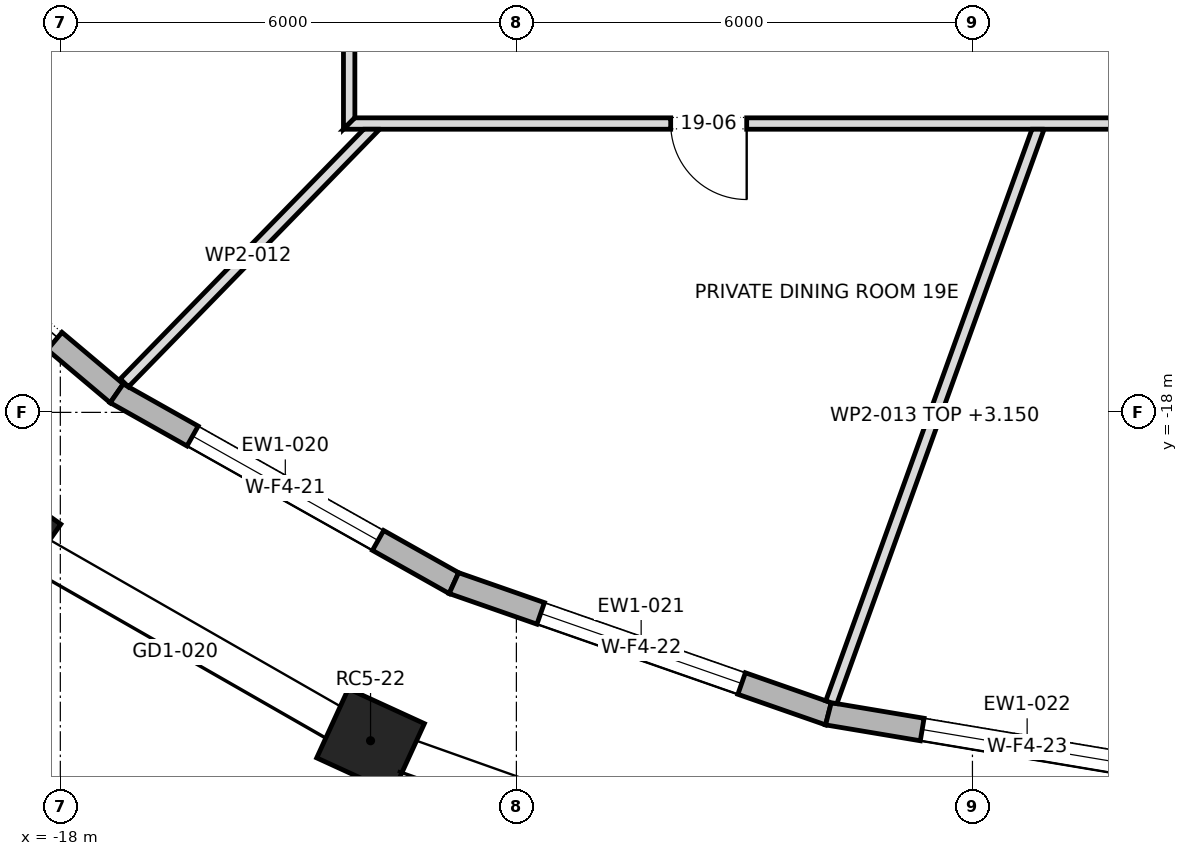
"""IFC4 building model, lengths in metres.
Left out: names, types, materials, properties, quantities, classifications, styles, units other than length and angle.
Written with IfcOpenShell. Run it as: python <this file> out.ifc"""

import sys

from ifc_helpers import new_model, si_unit, direction, frame, frame_2d, origin, origin_2d, place, context, subcontext, project, spatial, polyline, rectangle, outline, extrude, element, fill, save


model = new_model("IFC4")
c1 = context("Model", 3, precision=1e-05, world=origin(), true_north=direction((0.0, 1.0)))
c2 = subcontext(c1, "Body", "Model", "MODEL_VIEW")
j1 = project(units=[si_unit("LENGTHUNIT", "METRE"), si_unit("PLANEANGLEUNIT", "RADIAN")], contexts=[c1])
p1 = place(None, origin())
s1 = spatial("IfcSite", under=j1, at=p1, CompositionType="ELEMENT")
p2 = place(p1, origin())
s2 = spatial("IfcBuilding", under=s1, at=p2, CompositionType="ELEMENT")
p3 = place(p2, frame((0.0, 0.0, 276.3)))
s3 = spatial("IfcBuildingStorey", under=s2, at=p3, CompositionType="ELEMENT", Elevation=276.3)
for number, where, z_axis, x_axis in (
    (1, (-18.731, -19.564, 0.0), (0.0, 0.0, 1.0), (0.818, -0.575, 0.0)),
    (2, (-13.919, -22.32, 0.0), (0.0, 0.0, 1.0), (0.909, -0.417, 0.0)),
):
    element("IfcColumn", number, at=place(p3, frame(where, z_axis=z_axis, x_axis=x_axis)), inside=s3, PredefinedType="COLUMN", context=c2, shape_type="SweptSolid", body=[
        extrude(rectangle(XDim=1.1, YDim=1.0, at=origin_2d()), origin(), (0.0, 0.0, 1.0), 4.0),
    ])
p4 = place(p3, frame((-21.032, -14.57, 0.0), z_axis=(0.0, 0.0, 1.0), x_axis=(0.764832940795, -0.644228664897, 0.0)))
e3 = element("IfcWall", 3, at=p4, inside=s3, PredefinedType="STANDARD", context=c2, shape_type="SweptSolid", body=[
    extrude(outline(polyline([(-0.015, -0.15), (4.949, -0.15), (4.921, 0.15), (0.015, 0.15), (-0.015, -0.15)])), origin(), (0.0, 0.0, 1.0), 3.7),
])
p5 = place(p4, frame((1.068, 0.0, 0.0)))
e4 = element("IfcOpeningElement", 4, at=p5, cuts=e3, PredefinedType="OPENING", context=c2, shape_type="SweptSolid", body=[
    extrude(rectangle(XDim=2.8, YDim=3.25, at=frame_2d((1.4, 1.625))), frame((0.0, 0.162, 0.0), z_axis=(0.0, -1.0, 0.0), x_axis=(1.0, 0.0, 0.0)), (0.0, 0.0, 1.0), 0.324),
])
p6 = place(p3, frame((-17.258, -17.75, 0.0), z_axis=(0.0, 0.0, 1.0), x_axis=(0.871433320402, -0.490513983585, 0.0)))
e5 = element("IfcWall", 5, at=p6, inside=s3, PredefinedType="STANDARD", context=c2, shape_type="SweptSolid", body=[
    extrude(outline(polyline([(-0.014, -0.15), (5.104, -0.15), (5.077, 0.15), (0.014, 0.15), (-0.014, -0.15)])), origin(), (0.0, 0.0, 1.0), 3.7),
])
p7 = place(p6, frame((1.145, 0.0, 0.6)))
e6 = element("IfcOpeningElement", 6, at=p7, cuts=e5, PredefinedType="OPENING", context=c2, shape_type="SweptSolid", body=[
    extrude(rectangle(XDim=2.8, YDim=2.65, at=frame_2d((1.4, 1.325))), frame((0.0, 0.162, 0.0), z_axis=(0.0, -1.0, 0.0), x_axis=(1.0, 0.0, 0.0)), (0.0, 0.0, 1.0), 0.324),
])
p8 = place(p3, frame((-12.822, -20.246, 0.0), z_axis=(0.0, 0.0, 1.0), x_axis=(0.9441693858, -0.329460423904, 0.0)))
e7 = element("IfcWall", 7, at=p8, inside=s3, PredefinedType="STANDARD", context=c2, shape_type="SweptSolid", body=[
    extrude(outline(polyline([(-0.013, -0.15), (5.231, -0.15), (5.206, 0.15), (0.013, 0.15), (-0.013, -0.15)])), origin(), (0.0, 0.0, 1.0), 3.7),
])
p9 = place(p8, frame((1.209, 0.0, 0.6)))
e8 = element("IfcOpeningElement", 8, at=p9, cuts=e7, PredefinedType="OPENING", context=c2, shape_type="SweptSolid", body=[
    extrude(rectangle(XDim=2.8, YDim=2.65, at=frame_2d((1.4, 1.325))), frame((0.0, 0.162, 0.0), z_axis=(0.0, -1.0, 0.0), x_axis=(1.0, 0.0, 0.0)), (0.0, 0.0, 1.0), 0.324),
])
p10 = place(p3, frame((-7.895, -21.966, 0.0), z_axis=(0.0, 0.0, 1.0), x_axis=(0.986250435411, -0.165257612993, 0.0)))
e9 = element("IfcWall", 9, at=p10, inside=s3, PredefinedType="STANDARD", context=c2, shape_type="SweptSolid", body=[
    extrude(outline(polyline([(-0.013, -0.15), (5.315, -0.15), (5.29, 0.15), (0.013, 0.15), (-0.013, -0.15)])), origin(), (0.0, 0.0, 1.0), 3.7),
])
p11 = place(p10, frame((1.251, 0.0, 0.6)))
e10 = element("IfcOpeningElement", 10, at=p11, cuts=e9, PredefinedType="OPENING", context=c2, shape_type="SweptSolid", body=[
    extrude(rectangle(XDim=2.8, YDim=2.65, at=frame_2d((1.4, 1.325))), frame((0.0, 0.162, 0.0), z_axis=(0.0, -1.0, 0.0), x_axis=(1.0, 0.0, 0.0)), (0.0, 0.0, 1.0), 0.324),
])
p12 = place(p3, frame((-14.2, -14.275, 0.0), z_axis=(0.0, 0.0, 1.0), x_axis=(0.0, 1.0, 0.0)))
e11 = element("IfcWall", 11, at=p12, inside=s3, PredefinedType="PARTITIONING", context=c2, shape_type="SweptSolid", body=[
    extrude(outline(polyline([(0.15, -0.075), (2.033, -0.075), (3.917, -0.075), (5.8, -0.075), (7.683, -0.075), (9.567, -0.075), (11.45, -0.075), (13.333, -0.075), (15.217, -0.075), (17.1, -0.075), (18.983, -0.075), (20.866, -0.075), (22.75, -0.075), (24.633, -0.075), (26.517, -0.075), (28.4, -0.075), (28.55, 0.075), (28.55, 0.075), (26.646, 0.075), (24.743, 0.075), (22.84, 0.075), (20.937, 0.075), (19.033, 0.075), (17.13, 0.075), (15.227, 0.075), (13.323, 0.075), (11.42, 0.075), (9.517, 0.075), (7.613, 0.075), (5.71, 0.075), (3.807, 0.075), (1.903, 0.075), (0.0, 0.075), (0.15, -0.075)])), origin(), (0.0, 0.0, 1.0), 3.7),
])
p13 = place(p12, frame((20.5, 0.0, 0.0)))
e12 = element("IfcOpeningElement", 12, at=p13, cuts=e11, PredefinedType="OPENING", context=c2, shape_type="SweptSolid", body=[
    extrude(rectangle(XDim=1.0, YDim=2.1, at=frame_2d((0.5, 1.05))), frame((0.0, 0.087, 0.0), z_axis=(0.0, -1.0, 0.0), x_axis=(1.0, 0.0, 0.0)), (0.0, 0.0, 1.0), 0.174),
])
p14 = place(p12, frame((11.595, 0.0, 0.0)))
e13 = element("IfcOpeningElement", 13, at=p14, cuts=e11, PredefinedType="OPENING", context=c2, shape_type="SweptSolid", body=[
    extrude(rectangle(XDim=1.0, YDim=2.1, at=frame_2d((0.5, 1.05))), frame((0.0, 0.087, 0.0), z_axis=(0.0, -1.0, 0.0), x_axis=(1.0, 0.0, 0.0)), (0.0, 0.0, 1.0), 0.174),
])
p15 = place(p12, frame((15.225, 0.0, 0.0)))
e14 = element("IfcOpeningElement", 14, at=p15, cuts=e11, PredefinedType="OPENING", context=c2, shape_type="SweptSolid", body=[
    extrude(rectangle(XDim=1.0, YDim=2.1, at=frame_2d((0.5, 1.05))), frame((0.0, 0.087, 0.0), z_axis=(0.0, -1.0, 0.0), x_axis=(1.0, 0.0, 0.0)), (0.0, 0.0, 1.0), 0.174),
])
p16 = place(p12, frame((4.86, 0.0, 0.0)))
e15 = element("IfcOpeningElement", 15, at=p16, cuts=e11, PredefinedType="OPENING", context=c2, shape_type="SweptSolid", body=[
    extrude(rectangle(XDim=1.0, YDim=2.1, at=frame_2d((0.5, 1.05))), frame((0.0, 0.087, 0.0), z_axis=(0.0, -1.0, 0.0), x_axis=(1.0, 0.0, 0.0)), (0.0, 0.0, 1.0), 0.174),
])
p17 = place(p3, frame((-14.275, -14.2, 0.0), z_axis=(0.0, 0.0, 1.0), x_axis=(1.0, 0.0, 0.0)))
e16 = element("IfcWall", 16, at=p17, inside=s3, PredefinedType="PARTITIONING", context=c2, shape_type="SweptSolid", body=[
    extrude(outline(polyline([(28.55, -0.075), (28.55, -0.075), (28.4, 0.075), (26.517, 0.075), (24.633, 0.075), (22.75, 0.075), (20.866, 0.075), (18.983, 0.075), (17.1, 0.075), (15.217, 0.075), (13.333, 0.075), (11.45, 0.075), (9.567, 0.075), (7.683, 0.075), (5.8, 0.075), (3.917, 0.075), (2.033, 0.075), (0.15, 0.075), (0.0, -0.075), (1.903, -0.075), (3.807, -0.075), (5.71, -0.075), (7.613, -0.075), (9.517, -0.075), (11.42, -0.075), (13.323, -0.075), (15.227, -0.075), (17.13, -0.075), (19.033, -0.075), (20.937, -0.075), (22.84, -0.075), (24.743, -0.075), (26.646, -0.075), (28.55, -0.075)])), origin(), (0.0, 0.0, 1.0), 3.7),
])
p18 = place(p17, frame((4.305, 0.0, 0.0)))
e17 = element("IfcOpeningElement", 17, at=p18, cuts=e16, PredefinedType="OPENING", context=c2, shape_type="SweptSolid", body=[
    extrude(rectangle(XDim=1.0, YDim=2.1, at=frame_2d((0.5, 1.05))), frame((0.0, 0.087, 0.0), z_axis=(0.0, -1.0, 0.0), x_axis=(1.0, 0.0, 0.0)), (0.0, 0.0, 1.0), 0.174),
])
p19 = place(p17, frame((17.735, 0.0, 0.0)))
e18 = element("IfcOpeningElement", 18, at=p19, cuts=e16, PredefinedType="OPENING", context=c2, shape_type="SweptSolid", body=[
    extrude(rectangle(XDim=1.8, YDim=2.1, at=frame_2d((0.9, 1.05))), frame((0.0, 0.087, 0.0), z_axis=(0.0, -1.0, 0.0), x_axis=(1.0, 0.0, 0.0)), (0.0, 0.0, 1.0), 0.174),
])
p20 = place(p3, frame((-13.852, -14.223, 0.0), z_axis=(0.0, 0.0, 1.0), x_axis=(-0.69820654799, -0.715896372629, 0.0)))
e19 = element("IfcWall", 19, at=p20, inside=s3, PredefinedType="PARTITIONING", context=c2, shape_type="SweptSolid", body=[
    extrude(outline(polyline([(4.734, -0.075), (4.734, 0.075), (4.734, 0.075), (3.156, 0.075), (1.578, 0.075), (0.0, 0.075), (0.0, 0.075), (0.146, -0.075), (1.675, -0.075), (3.205, -0.075), (4.734, -0.075)])), origin(), (0.0, 0.0, 1.0), 3.7),
])
p21 = place(p3, frame((-5.128, -14.25, 0.0), z_axis=(0.0, 0.0, 1.0), x_axis=(-0.339369350229, -0.940653200773, 0.0)))
e20 = element("IfcWall", 20, at=p21, inside=s3, PredefinedType="PARTITIONING", context=c2, shape_type="SweptSolid", body=[
    extrude(outline(polyline([(8.047, -0.075), (8.047, -0.03), (8.047, 0.001), (8.033, 0.075), (6.427, 0.075), (4.82, 0.075), (3.213, 0.075), (1.607, 0.075), (0.0, 0.075), (0.0, 0.074), (0.054, -0.075), (2.052, -0.075), (4.05, -0.075), (6.049, -0.075), (8.047, -0.075)])), origin(), (0.0, 0.0, 1.0), 3.15),
])
p22 = place(p5, origin())
e21 = element("IfcDoor", 21, at=p22, inside=s3, OperationType="DOUBLE_DOOR_SLIDING", PredefinedType="DOOR", context=c2, shape_type="SweptSolid", body=[
    extrude(rectangle(XDim=2.8, YDim=3.25, at=frame_2d((1.4, 1.625))), frame((0.0, 0.025, 0.0), z_axis=(0.0, -1.0, 0.0), x_axis=(1.0, 0.0, 0.0)), (0.0, 0.0, 1.0), 0.05),
])
fill(e4, e21)
p23 = place(p7, origin())
e22 = element("IfcWindow", 22, at=p23, inside=s3, PartitioningType="DOUBLE_PANEL_VERTICAL", PredefinedType="WINDOW", context=c2, shape_type="SweptSolid", body=[
    extrude(rectangle(XDim=2.8, YDim=2.65, at=frame_2d((1.4, 1.325))), frame((0.0, 0.03, 0.0), z_axis=(0.0, -1.0, 0.0), x_axis=(1.0, 0.0, 0.0)), (0.0, 0.0, 1.0), 0.06),
])
fill(e6, e22)
p24 = place(p9, origin())
e23 = element("IfcWindow", 23, at=p24, inside=s3, PartitioningType="DOUBLE_PANEL_VERTICAL", PredefinedType="WINDOW", context=c2, shape_type="SweptSolid", body=[
    extrude(rectangle(XDim=2.8, YDim=2.65, at=frame_2d((1.4, 1.325))), frame((0.0, 0.03, 0.0), z_axis=(0.0, -1.0, 0.0), x_axis=(1.0, 0.0, 0.0)), (0.0, 0.0, 1.0), 0.06),
])
fill(e8, e23)
p25 = place(p11, origin())
e24 = element("IfcWindow", 24, at=p25, inside=s3, PartitioningType="DOUBLE_PANEL_VERTICAL", PredefinedType="WINDOW", context=c2, shape_type="SweptSolid", body=[
    extrude(rectangle(XDim=2.8, YDim=2.65, at=frame_2d((1.4, 1.325))), frame((0.0, 0.03, 0.0), z_axis=(0.0, -1.0, 0.0), x_axis=(1.0, 0.0, 0.0)), (0.0, 0.0, 1.0), 0.06),
])
fill(e10, e24)
p26 = place(p18, frame((1.0, 0.0, 0.0), z_axis=(0.0, 0.0, 1.0), x_axis=(-1.0, 0.0, 0.0)))
e25 = element("IfcDoor", 25, at=p26, inside=s3, OperationType="SINGLE_SWING_RIGHT", PredefinedType="DOOR", context=c2, shape_type="SweptSolid", body=[
    extrude(rectangle(XDim=1.0, YDim=2.1, at=frame_2d((0.5, 1.05))), frame((0.0, 0.025, 0.0), z_axis=(0.0, -1.0, 0.0), x_axis=(1.0, 0.0, 0.0)), (0.0, 0.0, 1.0), 0.05),
])
fill(e17, e25)
save(model, sys.argv[1])
